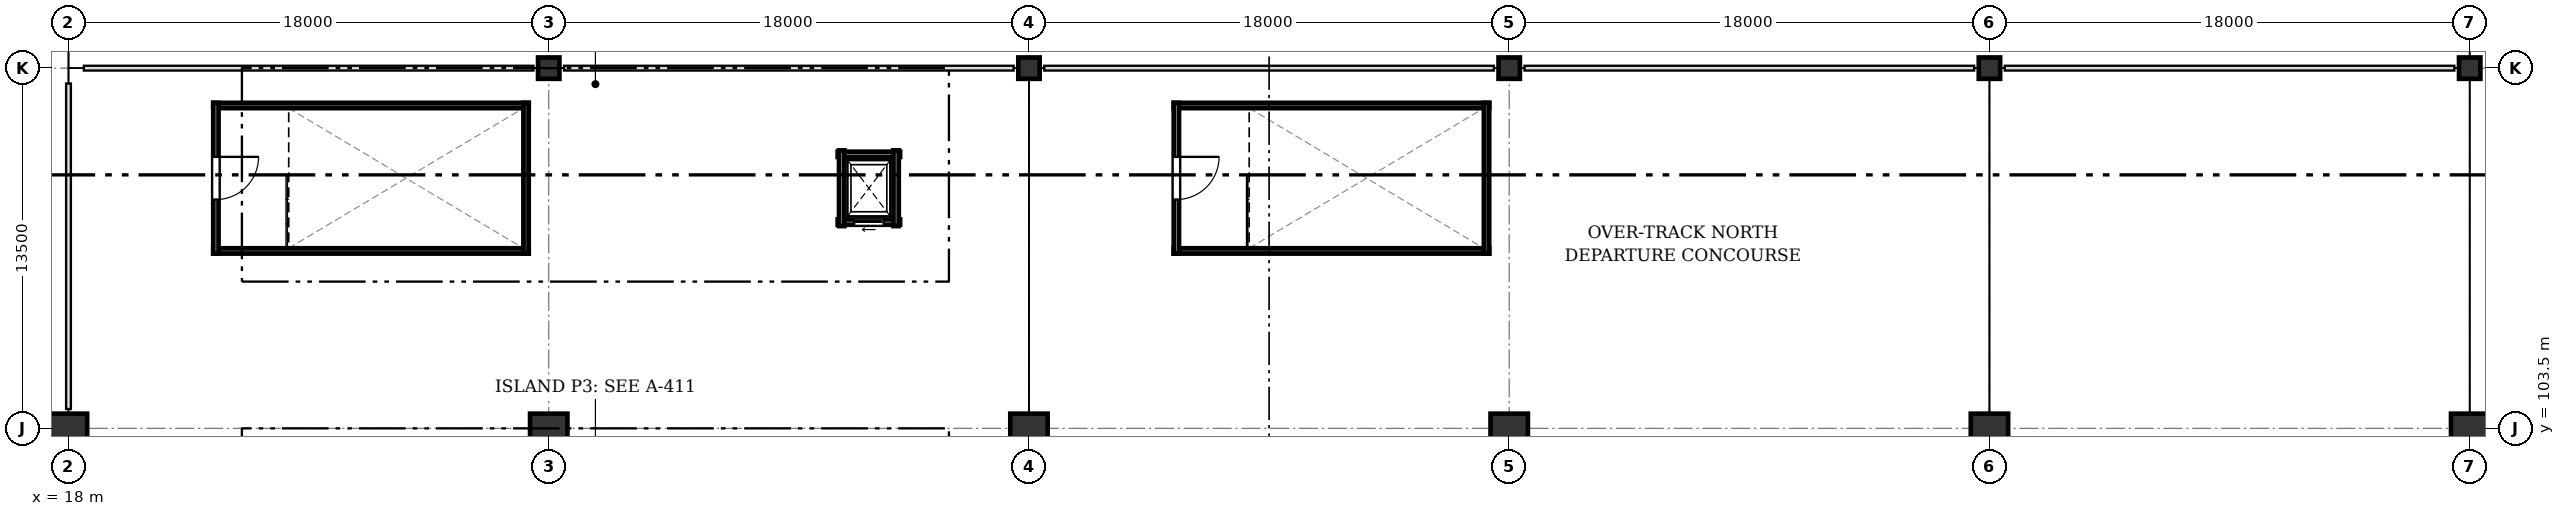
"""IFC4 building model, lengths in metres.
Left out: names, types, materials, properties, quantities, classifications, styles, units other than length and angle.
Written with IfcOpenShell. Run it as: python <this file> out.ifc"""

import sys

from ifc_helpers import new_model, si_unit, direction, frame, frame_2d, origin, origin_2d, place, context, subcontext, project, spatial, rectangle, extrude, element, fill, save


model = new_model("IFC4")
c1 = context("Model", 3, precision=1e-05, world=origin(), true_north=direction((0.0, 1.0)))
c2 = subcontext(c1, "Body", "Model", "MODEL_VIEW")
j1 = project(units=[si_unit("LENGTHUNIT", "METRE"), si_unit("PLANEANGLEUNIT", "RADIAN")], contexts=[c1])
p1 = place(None, origin())
s1 = spatial("IfcSite", under=j1, at=p1, CompositionType="ELEMENT")
p2 = place(p1, origin())
s2 = spatial("IfcBuilding", under=s1, at=p2, CompositionType="ELEMENT")
p3 = place(p2, frame((0.0, 0.0, 6.6)))
s3 = spatial("IfcBuildingStorey", under=s2, at=p3, CompositionType="ELEMENT", Elevation=6.6)
for number, where, z_axis, x_axis in (
    (1, (18.0, 103.5, 0.0), (0.0, 0.0, 1.0), (1.0, 0.0, 0.0)),
    (2, (36.0, 103.5, 0.0), (0.0, 0.0, 1.0), (1.0, 0.0, 0.0)),
):
    element("IfcColumn", number, at=place(p3, frame(where, z_axis=z_axis, x_axis=x_axis)), inside=s3, PredefinedType="COLUMN", context=c2, shape_type="SweptSolid", body=[
        extrude(rectangle(XDim=1.4, YDim=1.1, at=origin_2d()), origin(), (0.0, 0.0, 1.0), 4.2),
    ])
p4 = place(p3, frame((36.0, 117.0, 0.0), z_axis=(0.0, 0.0, 1.0), x_axis=(1.0, 0.0, 0.0)))
e3 = element("IfcColumn", 3, at=p4, inside=s3, PredefinedType="COLUMN", context=c2, shape_type="SweptSolid", body=[
    extrude(rectangle(XDim=0.8, YDim=0.8, at=origin_2d()), origin(), (0.0, 0.0, 1.0), 4.2),
])
p5 = place(p3, frame((54.0, 103.5, 0.0), z_axis=(0.0, 0.0, 1.0), x_axis=(1.0, 0.0, 0.0)))
e4 = element("IfcColumn", 4, at=p5, inside=s3, PredefinedType="COLUMN", context=c2, shape_type="SweptSolid", body=[
    extrude(rectangle(XDim=1.4, YDim=1.1, at=origin_2d()), origin(), (0.0, 0.0, 1.0), 4.2),
])
p6 = place(p3, frame((54.0, 117.0, 0.0), z_axis=(0.0, 0.0, 1.0), x_axis=(1.0, 0.0, 0.0)))
e5 = element("IfcColumn", 5, at=p6, inside=s3, PredefinedType="COLUMN", context=c2, shape_type="SweptSolid", body=[
    extrude(rectangle(XDim=0.8, YDim=0.8, at=origin_2d()), origin(), (0.0, 0.0, 1.0), 4.2),
])
p7 = place(p3, frame((72.0, 103.5, 0.0), z_axis=(0.0, 0.0, 1.0), x_axis=(1.0, 0.0, 0.0)))
e6 = element("IfcColumn", 6, at=p7, inside=s3, PredefinedType="COLUMN", context=c2, shape_type="SweptSolid", body=[
    extrude(rectangle(XDim=1.4, YDim=1.1, at=origin_2d()), origin(), (0.0, 0.0, 1.0), 4.2),
])
p8 = place(p3, frame((72.0, 117.0, 0.0), z_axis=(0.0, 0.0, 1.0), x_axis=(1.0, 0.0, 0.0)))
e7 = element("IfcColumn", 7, at=p8, inside=s3, PredefinedType="COLUMN", context=c2, shape_type="SweptSolid", body=[
    extrude(rectangle(XDim=0.8, YDim=0.8, at=origin_2d()), origin(), (0.0, 0.0, 1.0), 4.2),
])
p9 = place(p3, frame((90.0, 103.5, 0.0), z_axis=(0.0, 0.0, 1.0), x_axis=(1.0, 0.0, 0.0)))
e8 = element("IfcColumn", 8, at=p9, inside=s3, PredefinedType="COLUMN", context=c2, shape_type="SweptSolid", body=[
    extrude(rectangle(XDim=1.4, YDim=1.1, at=origin_2d()), origin(), (0.0, 0.0, 1.0), 4.2),
])
p10 = place(p3, frame((90.0, 117.0, 0.0), z_axis=(0.0, 0.0, 1.0), x_axis=(1.0, 0.0, 0.0)))
e9 = element("IfcColumn", 9, at=p10, inside=s3, PredefinedType="COLUMN", context=c2, shape_type="SweptSolid", body=[
    extrude(rectangle(XDim=0.8, YDim=0.8, at=origin_2d()), origin(), (0.0, 0.0, 1.0), 4.2),
])
p11 = place(p3, frame((108.0, 103.5, 0.0), z_axis=(0.0, 0.0, 1.0), x_axis=(1.0, 0.0, 0.0)))
e10 = element("IfcColumn", 10, at=p11, inside=s3, PredefinedType="COLUMN", context=c2, shape_type="SweptSolid", body=[
    extrude(rectangle(XDim=1.4, YDim=1.1, at=origin_2d()), origin(), (0.0, 0.0, 1.0), 4.2),
])
p12 = place(p3, frame((108.0, 117.0, 0.0), z_axis=(0.0, 0.0, 1.0), x_axis=(1.0, 0.0, 0.0)))
e11 = element("IfcColumn", 11, at=p12, inside=s3, PredefinedType="COLUMN", context=c2, shape_type="SweptSolid", body=[
    extrude(rectangle(XDim=0.8, YDim=0.8, at=origin_2d()), origin(), (0.0, 0.0, 1.0), 4.2),
])
for number, where, z_axis, x_axis in (
    (12, (23.425, 110.15, 0.0), (0.0, 0.0, 1.0), (1.0, 0.0, 0.0)),
    (13, (35.25, 115.6, 0.0), (0.0, 0.0, 1.0), (-1.0, 0.0, 0.0)),
):
    element("IfcWall", number, at=place(p3, frame(where, z_axis=z_axis, x_axis=x_axis)), inside=s3, PredefinedType="SOLIDWALL", context=c2, shape_type="SweptSolid", body=[
        extrude(rectangle(XDim=11.825, YDim=0.2, at=frame_2d((5.913, 0.0))), origin(), (0.0, 0.0, 1.0), 2.45),
    ])
p13 = place(p3, frame((35.15, 110.05, 0.0), z_axis=(0.0, 0.0, 1.0), x_axis=(0.0, 1.0, 0.0)))
e14 = element("IfcWall", 14, at=p13, inside=s3, PredefinedType="SOLIDWALL", context=c2, shape_type="SweptSolid", body=[
    extrude(rectangle(XDim=5.65, YDim=0.2, at=frame_2d((2.825, 0.0))), origin(), (0.0, 0.0, 1.0), 2.45),
])
p14 = place(p3, frame((23.525, 115.7, 0.0), z_axis=(0.0, 0.0, 1.0), x_axis=(0.0, -1.0, 0.0)))
e15 = element("IfcWall", 15, at=p14, inside=s3, PredefinedType="SOLIDWALL", context=c2, shape_type="SweptSolid", body=[
    extrude(rectangle(XDim=5.65, YDim=0.2, at=frame_2d((2.825, 0.0))), origin(), (0.0, 0.0, 1.0), 2.45),
])
p15 = place(p14, frame((2.025, 0.0, 0.0)))
e16 = element("IfcOpeningElement", 16, at=p15, cuts=e15, PredefinedType="OPENING", context=c2, shape_type="SweptSolid", body=[
    extrude(rectangle(XDim=1.6, YDim=2.15, at=frame_2d((0.8, 1.075))), frame((0.0, 0.11, 0.0), z_axis=(0.0, -1.0, 0.0), x_axis=(1.0, 0.0, 0.0)), (0.0, 0.0, 1.0), 0.22),
])
for number, where, z_axis, x_axis in (
    (17, (59.425, 110.15, 0.0), (0.0, 0.0, 1.0), (1.0, 0.0, 0.0)),
    (18, (71.25, 115.6, 0.0), (0.0, 0.0, 1.0), (-1.0, 0.0, 0.0)),
):
    element("IfcWall", number, at=place(p3, frame(where, z_axis=z_axis, x_axis=x_axis)), inside=s3, PredefinedType="SOLIDWALL", context=c2, shape_type="SweptSolid", body=[
        extrude(rectangle(XDim=11.825, YDim=0.2, at=frame_2d((5.913, 0.0))), origin(), (0.0, 0.0, 1.0), 2.45),
    ])
p16 = place(p3, frame((71.15, 110.05, 0.0), z_axis=(0.0, 0.0, 1.0), x_axis=(0.0, 1.0, 0.0)))
e19 = element("IfcWall", 19, at=p16, inside=s3, PredefinedType="SOLIDWALL", context=c2, shape_type="SweptSolid", body=[
    extrude(rectangle(XDim=5.65, YDim=0.2, at=frame_2d((2.825, 0.0))), origin(), (0.0, 0.0, 1.0), 2.45),
])
p17 = place(p3, frame((59.525, 115.7, 0.0), z_axis=(0.0, 0.0, 1.0), x_axis=(0.0, -1.0, 0.0)))
e20 = element("IfcWall", 20, at=p17, inside=s3, PredefinedType="SOLIDWALL", context=c2, shape_type="SweptSolid", body=[
    extrude(rectangle(XDim=5.65, YDim=0.2, at=frame_2d((2.825, 0.0))), origin(), (0.0, 0.0, 1.0), 2.45),
])
p18 = place(p17, frame((2.025, 0.0, 0.0)))
e21 = element("IfcOpeningElement", 21, at=p18, cuts=e20, PredefinedType="OPENING", context=c2, shape_type="SweptSolid", body=[
    extrude(rectangle(XDim=1.6, YDim=2.15, at=frame_2d((0.8, 1.075))), frame((0.0, 0.11, 0.0), z_axis=(0.0, -1.0, 0.0), x_axis=(1.0, 0.0, 0.0)), (0.0, 0.0, 1.0), 0.22),
])
p19 = place(p3, frame((46.83, 111.23, 0.0), z_axis=(0.0, 0.0, 1.0), x_axis=(1.0, 0.0, 0.0)))
e22 = element("IfcWall", 22, at=p19, inside=s3, PredefinedType="SOLIDWALL", context=c2, shape_type="SweptSolid", body=[
    extrude(rectangle(XDim=2.34, YDim=0.2, at=frame_2d((1.17, 0.0))), origin(), (0.0, 0.0, 1.0), 3.875),
])
p20 = place(p19, frame((0.62, 0.0, 0.0)))
e23 = element("IfcOpeningElement", 23, at=p20, cuts=e22, PredefinedType="OPENING", context=c2, shape_type="SweptSolid", body=[
    extrude(rectangle(XDim=1.1, YDim=2.15, at=frame_2d((0.55, 1.075))), frame((0.0, 0.11, 0.0), z_axis=(0.0, -1.0, 0.0), x_axis=(1.0, 0.0, 0.0)), (0.0, 0.0, 1.0), 0.22),
])
p21 = place(p3, frame((49.17, 113.77, 0.0), z_axis=(0.0, 0.0, 1.0), x_axis=(-1.0, 0.0, 0.0)))
e24 = element("IfcWall", 24, at=p21, inside=s3, PredefinedType="SOLIDWALL", context=c2, shape_type="SweptSolid", body=[
    extrude(rectangle(XDim=2.34, YDim=0.2, at=frame_2d((1.17, 0.0))), origin(), (0.0, 0.0, 1.0), 3.875),
])
for number, where, z_axis, x_axis in (
    (25, (46.98, 113.92, 0.0), (0.0, 0.0, 1.0), (0.0, -1.0, 0.0)),
    (26, (49.02, 111.08, 0.0), (0.0, 0.0, 1.0), (0.0, 1.0, 0.0)),
):
    element("IfcWall", number, at=place(p3, frame(where, z_axis=z_axis, x_axis=x_axis)), inside=s3, PredefinedType="SOLIDWALL", context=c2, shape_type="SweptSolid", body=[
        extrude(rectangle(XDim=2.84, YDim=0.2, at=frame_2d((1.42, 0.0))), origin(), (0.0, 0.0, 1.0), 3.875),
    ])
p22 = place(p15, origin())
e27 = element("IfcDoor", 27, at=p22, inside=s3, OperationType="SINGLE_SWING_LEFT", PredefinedType="DOOR", context=c2, shape_type="SweptSolid", body=[
    extrude(rectangle(XDim=1.6, YDim=2.15, at=frame_2d((0.8, 1.075))), frame((0.0, 0.025, 0.0), z_axis=(0.0, -1.0, 0.0), x_axis=(1.0, 0.0, 0.0)), (0.0, 0.0, 1.0), 0.05),
])
fill(e16, e27)
p23 = place(p18, origin())
e28 = element("IfcDoor", 28, at=p23, inside=s3, OperationType="SINGLE_SWING_LEFT", PredefinedType="DOOR", context=c2, shape_type="SweptSolid", body=[
    extrude(rectangle(XDim=1.6, YDim=2.15, at=frame_2d((0.8, 1.075))), frame((0.0, 0.025, 0.0), z_axis=(0.0, -1.0, 0.0), x_axis=(1.0, 0.0, 0.0)), (0.0, 0.0, 1.0), 0.05),
])
fill(e21, e28)
p24 = place(p20, origin())
e29 = element("IfcDoor", 29, at=p24, inside=s3, OperationType="SLIDING_TO_LEFT", PredefinedType="DOOR", context=c2, shape_type="SweptSolid", body=[
    extrude(rectangle(XDim=1.1, YDim=2.15, at=frame_2d((0.55, 1.075))), frame((0.0, 0.025, 0.0), z_axis=(0.0, -1.0, 0.0), x_axis=(1.0, 0.0, 0.0)), (0.0, 0.0, 1.0), 0.05),
])
fill(e23, e29)
save(model, sys.argv[1])
